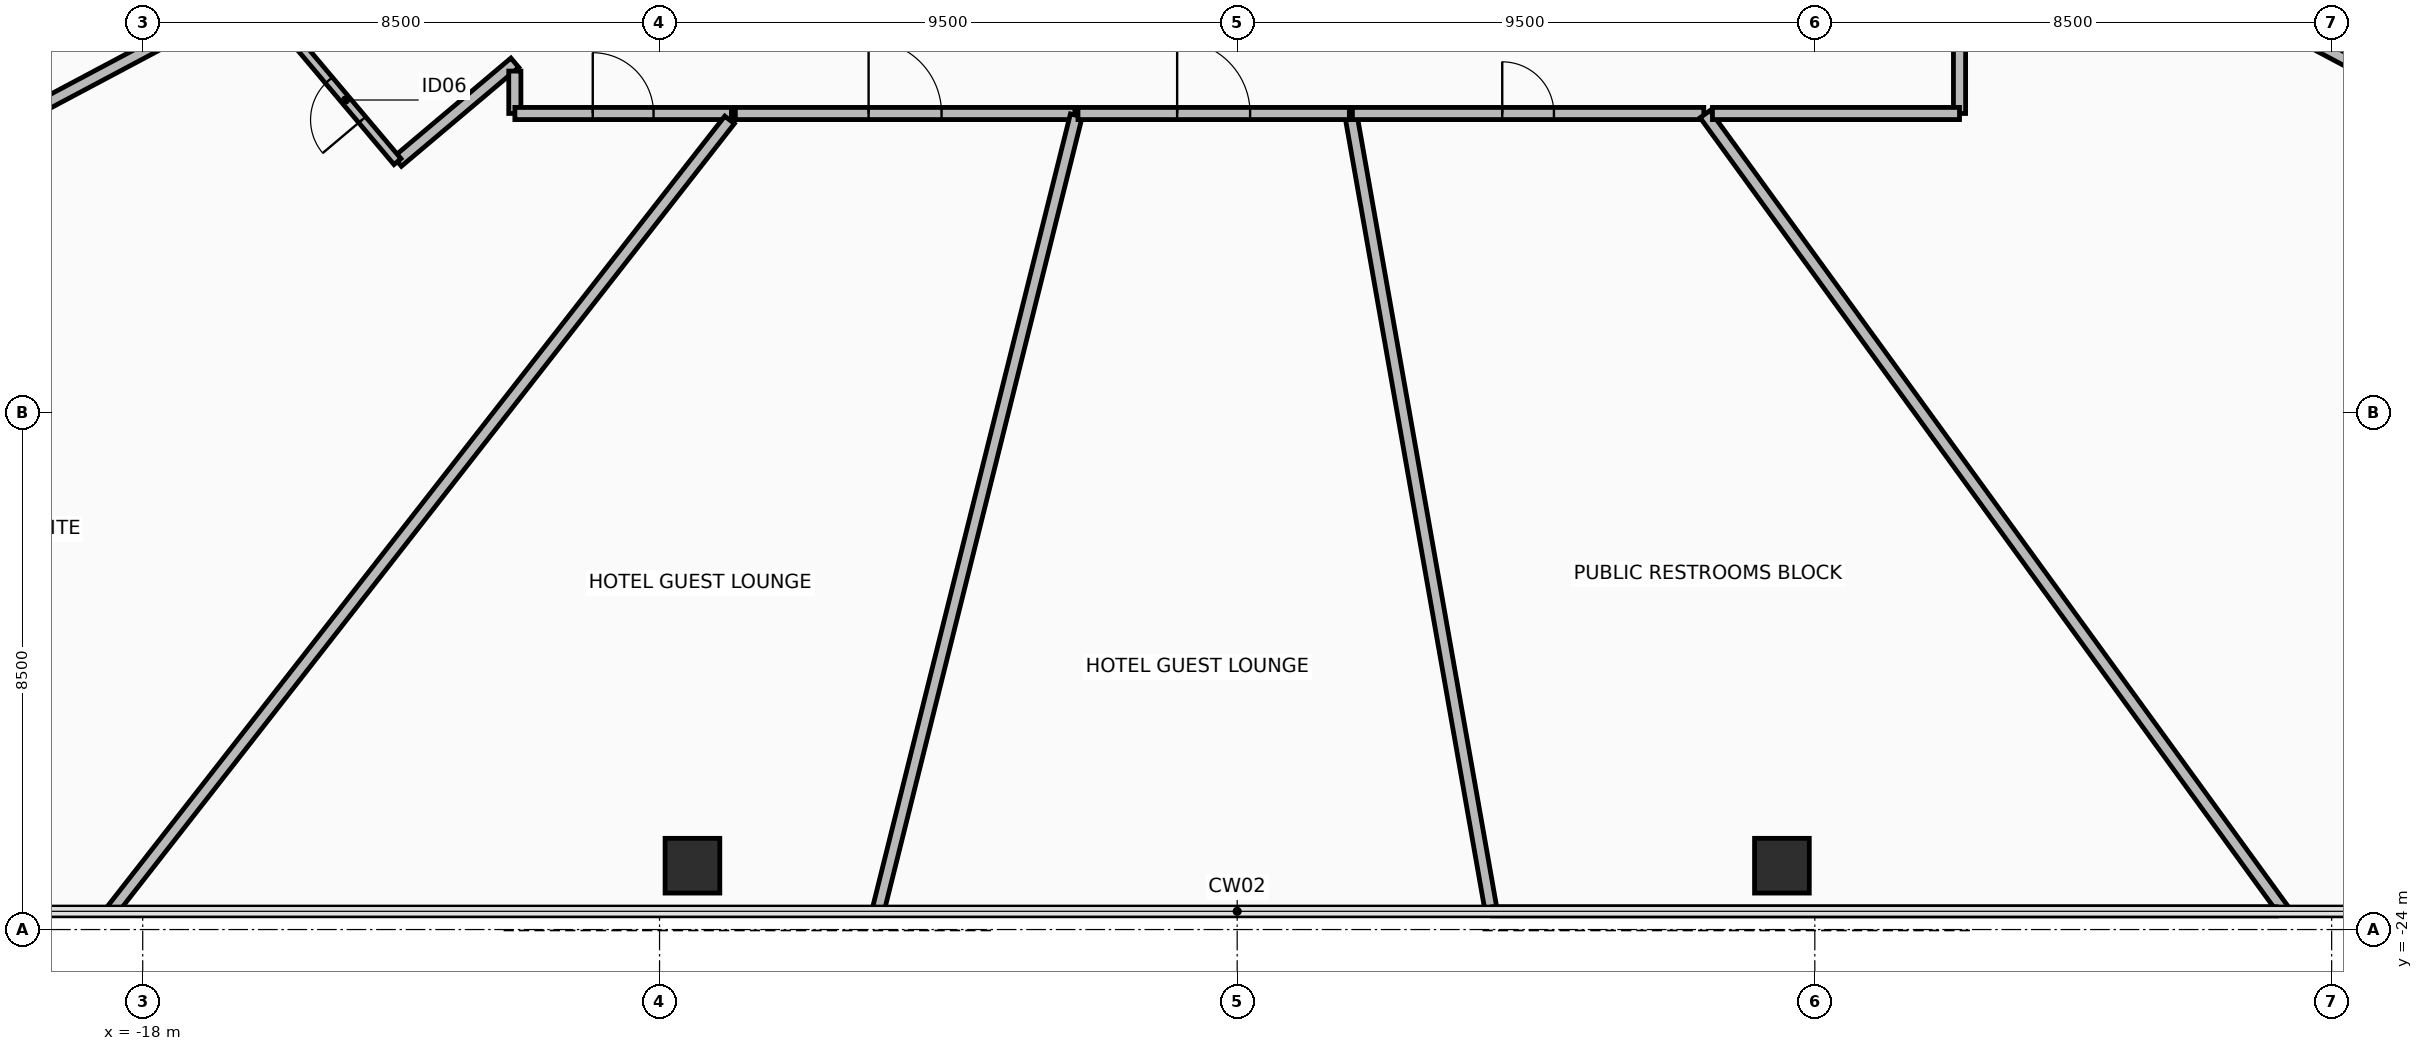
"""IFC4 building model, lengths in metres.
Left out: names, types, materials, properties, quantities, classifications, styles, units other than length and angle.
Written with IfcOpenShell. Run it as: python <this file> out.ifc"""

import sys

from ifc_helpers import new_model, si_unit, direction, frame, frame_2d, origin, origin_2d, place, context, subcontext, project, spatial, rectangle, hollow_rectangle, extrude, element, fill, save


model = new_model("IFC4")
c1 = context("Model", 3, precision=1e-05, world=origin(), true_north=direction((0.0, 1.0)))
c2 = subcontext(c1, "Body", "Model", "MODEL_VIEW")
j1 = project(units=[si_unit("LENGTHUNIT", "METRE"), si_unit("PLANEANGLEUNIT", "RADIAN")], contexts=[c1])
p1 = place(None, origin())
s1 = spatial("IfcSite", under=j1, at=p1, CompositionType="ELEMENT")
p2 = place(p1, origin())
s2 = spatial("IfcBuilding", under=s1, at=p2, CompositionType="ELEMENT")
p3 = place(p2, frame((0.0, 0.0, 45.45)))
s3 = spatial("IfcBuildingStorey", under=s2, at=p3, CompositionType="ELEMENT", Elevation=45.45)
for number, where, z_axis, x_axis in (
    (1, (-8.959, -22.95, 0.0), (0.0, 0.0, 1.0), (1.0, 0.0, 0.0)),
    (2, (8.959, -22.95, 0.0), (0.0, 0.0, 1.0), (1.0, 0.0, 0.0)),
):
    element("IfcColumn", number, at=place(p3, frame(where, z_axis=z_axis, x_axis=x_axis)), inside=s3, PredefinedType="COLUMN", context=c2, shape_type="SweptSolid", body=[
        extrude(hollow_rectangle(XDim=0.9, YDim=0.9, WallThickness=0.05, at=origin_2d()), origin(), (0.0, 0.0, 1.0), 3.4),
    ])
p4 = place(p3, frame((-11.88, -9.745, 0.0), z_axis=(0.0, 0.0, 1.0), x_axis=(-0.764712982519, -0.644371053328, 0.0)))
e3 = element("IfcWall", 3, at=p4, inside=s3, PredefinedType="PARTITIONING", context=c2, shape_type="SweptSolid", body=[
    extrude(rectangle(XDim=2.524, YDim=0.2, at=frame_2d((1.262, 0.0))), origin(), (0.0, 0.0, 1.0), 3.225),
])
p5 = place(p3, frame((-13.81, -11.371, 0.0), z_axis=(0.0, 0.0, 1.0), x_axis=(-0.644478981733, 0.764622025647, 0.0)))
e4 = element("IfcWall", 4, at=p5, inside=s3, PredefinedType="PARTITIONING", context=c2, shape_type="SweptSolid", body=[
    extrude(rectangle(XDim=2.65, YDim=0.15, at=frame_2d((1.325, 0.0))), origin(), (0.0, 0.0, 1.0), 2.62),
])
p6 = place(p5, frame((0.9, 0.0, 0.0)))
e5 = element("IfcOpeningElement", 5, at=p6, cuts=e4, PredefinedType="OPENING", context=c2, shape_type="SweptSolid", body=[
    extrude(rectangle(XDim=0.85, YDim=2.1, at=frame_2d((0.425, 1.05))), frame((0.0, 0.085, 0.0), z_axis=(0.0, -1.0, 0.0), x_axis=(1.0, 0.0, 0.0)), (0.0, 0.0, 1.0), 0.17),
])
p7 = place(p3, frame((-11.893, -6.324, 0.0), z_axis=(0.0, 0.0, 1.0), x_axis=(-0.882944790092, -0.469476833985, 0.0)))
e6 = element("IfcWall", 6, at=p7, inside=s3, PredefinedType="PARTITIONING", context=c2, shape_type="SweptSolid", body=[
    extrude(rectangle(XDim=17.667, YDim=0.2, at=frame_2d((8.833, 0.0))), origin(), (0.0, 0.0, 1.0), 2.42),
])
p8 = place(p3, frame((4.175, -23.679, 0.0), z_axis=(0.0, 0.0, 1.0), x_axis=(-0.173657301911, 0.984806144118, 0.0)))
e7 = element("IfcWall", 7, at=p8, inside=s3, PredefinedType="PARTITIONING", context=c2, shape_type="SweptSolid", body=[
    extrude(rectangle(XDim=13.271, YDim=0.2, at=frame_2d((6.636, 0.0))), origin(), (0.0, 0.0, 1.0), 2.42),
])
p9 = place(p3, frame((1.895, -10.58, 0.0), z_axis=(0.0, 0.0, 1.0), x_axis=(1.0, 0.0, 0.0)))
e8 = element("IfcWall", 8, at=p9, inside=s3, PredefinedType="PARTITIONING", context=c2, shape_type="SweptSolid", body=[
    extrude(rectangle(XDim=5.779, YDim=0.2, at=frame_2d((2.889, 0.0))), origin(), (0.0, 0.0, 1.0), 3.225),
])
p10 = place(p9, frame((2.464, 0.0, 0.0)))
e9 = element("IfcOpeningElement", 9, at=p10, cuts=e8, PredefinedType="OPENING", context=c2, shape_type="SweptSolid", body=[
    extrude(rectangle(XDim=0.85, YDim=2.1, at=frame_2d((0.425, 1.05))), frame((0.0, 0.11, 0.0), z_axis=(0.0, -1.0, 0.0), x_axis=(1.0, 0.0, 0.0)), (0.0, 0.0, 1.0), 0.22),
])
p11 = place(p3, frame((7.694, -10.59, 0.0), z_axis=(0.0, 0.0, 1.0), x_axis=(0.587783732443, -0.809018098608, 0.0)))
e10 = element("IfcWall", 10, at=p11, inside=s3, PredefinedType="PARTITIONING", context=c2, shape_type="SweptSolid", body=[
    extrude(rectangle(XDim=16.204, YDim=0.2, at=frame_2d((8.102, 0.0))), origin(), (0.0, 0.0, 1.0), 2.42),
])
p12 = place(p3, frame((17.089, -23.7, 0.0), z_axis=(0.0, 0.0, 1.0), x_axis=(-1.0, 0.0, 0.0)))
e11 = element("IfcWall", 11, at=p12, inside=s3, PredefinedType="PARTITIONING", context=c2, shape_type="SweptSolid", body=[
    extrude(rectangle(XDim=12.889, YDim=0.15, at=frame_2d((6.445, 0.0))), origin(), (0.0, 0.0, 1.0), 3.225),
])
p13 = place(p3, frame((-11.88, -9.882, 0.0), z_axis=(0.0, 0.0, 1.0), x_axis=(0.0, -1.0, 0.0)))
e12 = element("IfcWall", 12, at=p13, inside=s3, PredefinedType="PARTITIONING", context=c2, shape_type="SweptSolid", body=[
    extrude(rectangle(XDim=0.697, YDim=0.2, at=frame_2d((0.349, 0.0))), origin(), (0.0, 0.0, 1.0), 2.62),
])
p14 = place(p3, frame((-11.879, -10.58, 0.0), z_axis=(0.0, 0.0, 1.0), x_axis=(1.0, 0.0, 0.0)))
e13 = element("IfcWall", 13, at=p14, inside=s3, PredefinedType="PARTITIONING", context=c2, shape_type="SweptSolid", body=[
    extrude(rectangle(XDim=3.562, YDim=0.2, at=frame_2d((1.781, 0.0))), origin(), (0.0, 0.0, 1.0), 2.62),
])
p15 = place(p14, frame((1.281, 0.0, 0.0)))
e14 = element("IfcOpeningElement", 14, at=p15, cuts=e13, PredefinedType="OPENING", context=c2, shape_type="SweptSolid", body=[
    extrude(rectangle(XDim=1.0, YDim=2.15, at=frame_2d((0.5, 1.075))), frame((0.0, 0.11, 0.0), z_axis=(0.0, -1.0, 0.0), x_axis=(1.0, 0.0, 0.0)), (0.0, 0.0, 1.0), 0.22),
])
p16 = place(p3, frame((-8.348, -10.685, 0.0), z_axis=(0.0, 0.0, 1.0), x_axis=(-0.615660691561, -0.78801136595, 0.0)))
e15 = element("IfcWall", 15, at=p16, inside=s3, PredefinedType="PARTITIONING", context=c2, shape_type="SweptSolid", body=[
    extrude(rectangle(XDim=16.504, YDim=0.2, at=frame_2d((8.252, 0.0))), origin(), (0.0, 0.0, 1.0), 2.42),
])
p17 = place(p3, frame((-8.254, -10.58, 0.0), z_axis=(0.0, 0.0, 1.0), x_axis=(1.0, 0.0, 0.0)))
e16 = element("IfcWall", 16, at=p17, inside=s3, PredefinedType="PARTITIONING", context=c2, shape_type="SweptSolid", body=[
    extrude(rectangle(XDim=5.584, YDim=0.2, at=frame_2d((2.792, 0.0))), origin(), (0.0, 0.0, 1.0), 3.225),
])
p18 = place(p17, frame((2.192, 0.0, 0.0)))
e17 = element("IfcOpeningElement", 17, at=p18, cuts=e16, PredefinedType="OPENING", context=c2, shape_type="SweptSolid", body=[
    extrude(rectangle(XDim=1.2, YDim=2.15, at=frame_2d((0.6, 1.075))), frame((0.0, 0.11, 0.0), z_axis=(0.0, -1.0, 0.0), x_axis=(1.0, 0.0, 0.0)), (0.0, 0.0, 1.0), 0.22),
])
p19 = place(p3, frame((-2.646, -10.611, 0.0), z_axis=(0.0, 0.0, 1.0), x_axis=(-0.241929995817, -0.970293706629, 0.0)))
e18 = element("IfcWall", 18, at=p19, inside=s3, PredefinedType="PARTITIONING", context=c2, shape_type="SweptSolid", body=[
    extrude(rectangle(XDim=13.47, YDim=0.2, at=frame_2d((6.735, 0.0))), origin(), (0.0, 0.0, 1.0), 2.42),
])
p20 = place(p3, frame((-2.618, -10.58, 0.0), z_axis=(0.0, 0.0, 1.0), x_axis=(1.0, 0.0, 0.0)))
e19 = element("IfcWall", 19, at=p20, inside=s3, PredefinedType="PARTITIONING", context=c2, shape_type="SweptSolid", body=[
    extrude(rectangle(XDim=4.463, YDim=0.2, at=frame_2d((2.231, 0.0))), origin(), (0.0, 0.0, 1.0), 3.225),
])
p21 = place(p20, frame((1.631, 0.0, 0.0)))
e20 = element("IfcOpeningElement", 20, at=p21, cuts=e19, PredefinedType="OPENING", context=c2, shape_type="SweptSolid", body=[
    extrude(rectangle(XDim=1.2, YDim=2.15, at=frame_2d((0.6, 1.075))), frame((0.0, 0.11, 0.0), z_axis=(0.0, -1.0, 0.0), x_axis=(1.0, 0.0, 0.0)), (0.0, 0.0, 1.0), 0.22),
])
p22 = place(p3, frame((11.88, -10.579, 0.0), z_axis=(0.0, 0.0, 1.0), x_axis=(0.0, 1.0, 0.0)))
e21 = element("IfcWall", 21, at=p22, inside=s3, PredefinedType="PARTITIONING", context=c2, shape_type="SweptSolid", body=[
    extrude(rectangle(XDim=4.221, YDim=0.2, at=frame_2d((2.11, 0.0))), origin(), (0.0, 0.0, 1.0), 2.62),
])
p23 = place(p22, frame((1.511, 0.0, 0.0)))
e22 = element("IfcOpeningElement", 22, at=p23, cuts=e21, PredefinedType="OPENING", context=c2, shape_type="SweptSolid", body=[
    extrude(rectangle(XDim=1.2, YDim=2.15, at=frame_2d((0.6, 1.075))), frame((0.0, 0.11, 0.0), z_axis=(0.0, -1.0, 0.0), x_axis=(1.0, 0.0, 0.0)), (0.0, 0.0, 1.0), 0.22),
])
p24 = place(p3, frame((11.985, -6.373, 0.0), z_axis=(0.0, 0.0, 1.0), x_axis=(0.882946229684, -0.469474126536, 0.0)))
e23 = element("IfcWall", 23, at=p24, inside=s3, PredefinedType="PARTITIONING", context=c2, shape_type="SweptSolid", body=[
    extrude(rectangle(XDim=17.556, YDim=0.2, at=frame_2d((8.778, 0.0))), origin(), (0.0, 0.0, 1.0), 2.42),
])
p25 = place(p3, frame((7.817, -10.58, 0.0), z_axis=(0.0, 0.0, 1.0), x_axis=(1.0, 0.0, 0.0)))
e24 = element("IfcWall", 24, at=p25, inside=s3, PredefinedType="PARTITIONING", context=c2, shape_type="SweptSolid", body=[
    extrude(rectangle(XDim=4.063, YDim=0.2, at=frame_2d((2.031, 0.0))), origin(), (0.0, 0.0, 1.0), 2.62),
])
p26 = place(p6, origin())
e25 = element("IfcDoor", 25, at=p26, inside=s3, OperationType="SINGLE_SWING_RIGHT", PredefinedType="DOOR", context=c2, shape_type="SweptSolid", body=[
    extrude(rectangle(XDim=0.85, YDim=2.1, at=frame_2d((0.425, 1.05))), frame((0.0, 0.025, 0.0), z_axis=(0.0, -1.0, 0.0), x_axis=(1.0, 0.0, 0.0)), (0.0, 0.0, 1.0), 0.05),
])
fill(e5, e25)
p27 = place(p10, origin())
e26 = element("IfcDoor", 26, at=p27, inside=s3, OperationType="SINGLE_SWING_RIGHT", PredefinedType="DOOR", context=c2, shape_type="SweptSolid", body=[
    extrude(rectangle(XDim=0.85, YDim=2.1, at=frame_2d((0.425, 1.05))), frame((0.0, 0.025, 0.0), z_axis=(0.0, -1.0, 0.0), x_axis=(1.0, 0.0, 0.0)), (0.0, 0.0, 1.0), 0.05),
])
fill(e9, e26)
p28 = place(p15, origin())
e27 = element("IfcDoor", 27, at=p28, inside=s3, OperationType="SINGLE_SWING_LEFT", PredefinedType="DOOR", context=c2, shape_type="SweptSolid", body=[
    extrude(rectangle(XDim=1.0, YDim=2.15, at=frame_2d((0.5, 1.075))), frame((0.0, 0.025, 0.0), z_axis=(0.0, -1.0, 0.0), x_axis=(1.0, 0.0, 0.0)), (0.0, 0.0, 1.0), 0.05),
])
fill(e14, e27)
p29 = place(p18, origin())
e28 = element("IfcDoor", 28, at=p29, inside=s3, OperationType="SINGLE_SWING_LEFT", PredefinedType="DOOR", context=c2, shape_type="SweptSolid", body=[
    extrude(rectangle(XDim=1.2, YDim=2.15, at=frame_2d((0.6, 1.075))), frame((0.0, 0.025, 0.0), z_axis=(0.0, -1.0, 0.0), x_axis=(1.0, 0.0, 0.0)), (0.0, 0.0, 1.0), 0.05),
])
fill(e17, e28)
p30 = place(p21, origin())
e29 = element("IfcDoor", 29, at=p30, inside=s3, OperationType="SINGLE_SWING_LEFT", PredefinedType="DOOR", context=c2, shape_type="SweptSolid", body=[
    extrude(rectangle(XDim=1.2, YDim=2.15, at=frame_2d((0.6, 1.075))), frame((0.0, 0.025, 0.0), z_axis=(0.0, -1.0, 0.0), x_axis=(1.0, 0.0, 0.0)), (0.0, 0.0, 1.0), 0.05),
])
fill(e20, e29)
save(model, sys.argv[1])
